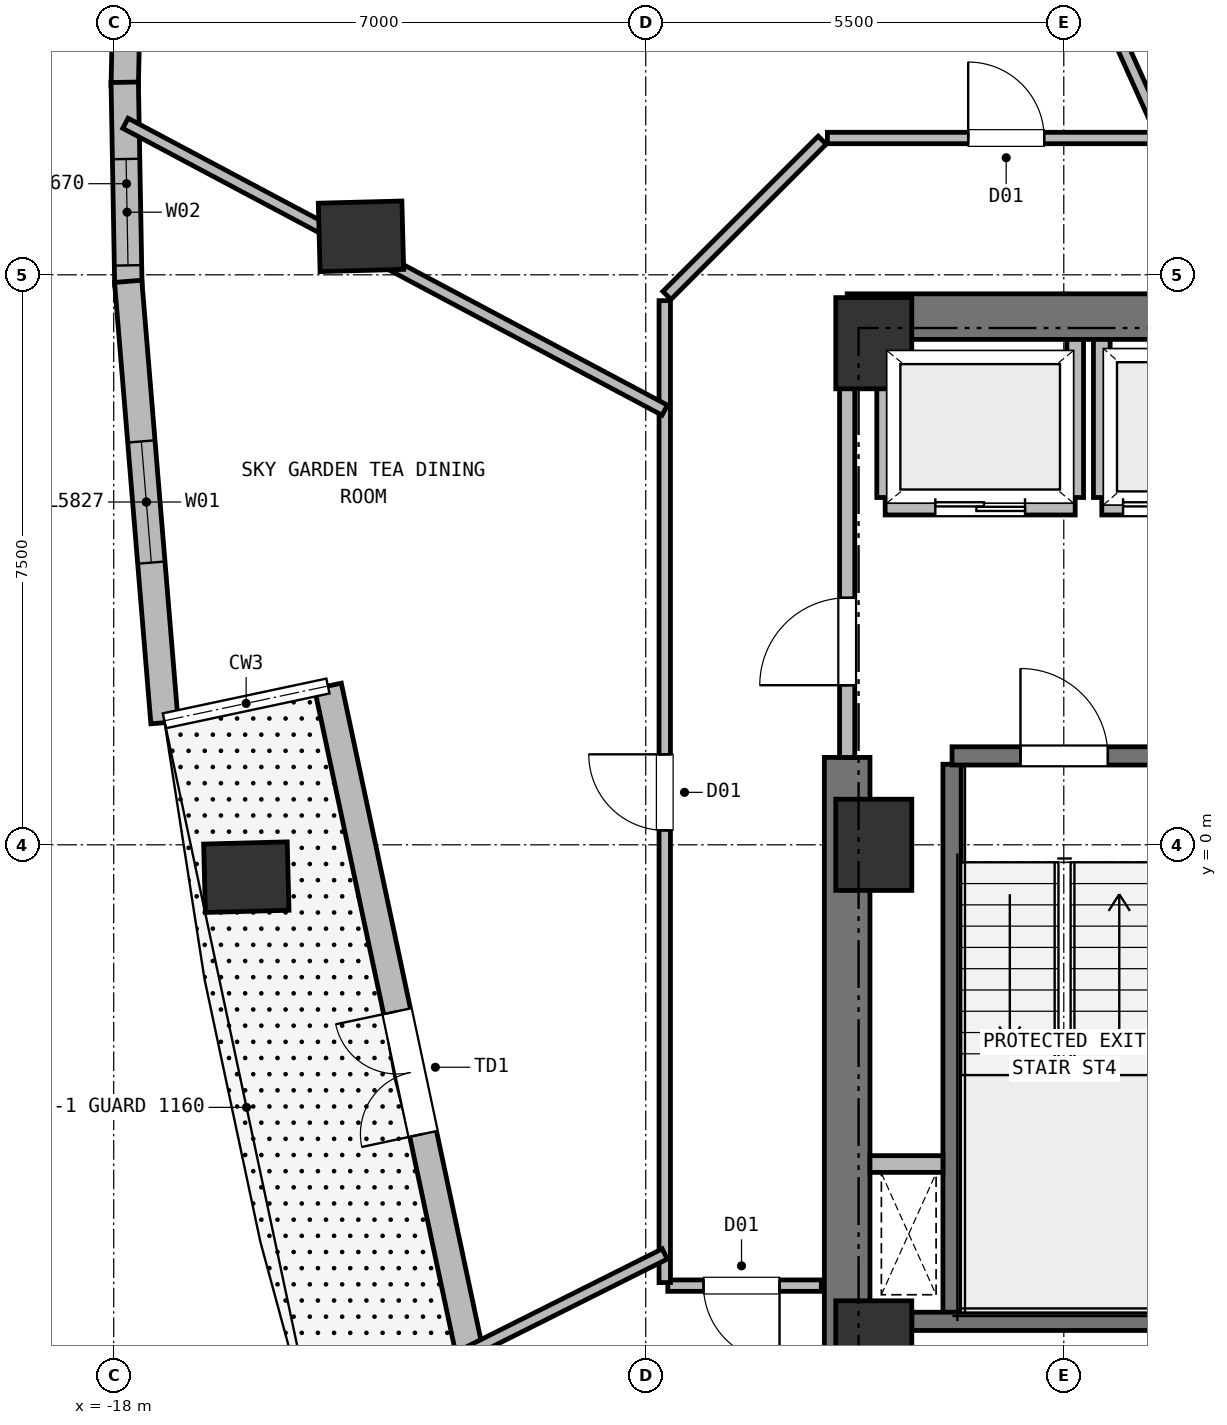
"""IFC4 building model, lengths in metres.
Left out: names, types, materials, properties, quantities, classifications, styles, units other than length and angle.
Written with IfcOpenShell. Run it as: python <this file> out.ifc"""

import sys

from ifc_helpers import new_model, si_unit, direction, frame, frame_2d, origin, origin_2d, place, context, subcontext, project, spatial, rectangle, extrude, element, fill, save


model = new_model("IFC4")
c1 = context("Model", 3, precision=1e-05, world=origin(), true_north=direction((0.0, 1.0)))
c2 = subcontext(c1, "Body", "Model", "MODEL_VIEW")
j1 = project(units=[si_unit("LENGTHUNIT", "METRE"), si_unit("PLANEANGLEUNIT", "RADIAN")], contexts=[c1])
p1 = place(None, origin())
s1 = spatial("IfcSite", under=j1, at=p1, CompositionType="ELEMENT")
p2 = place(p1, origin())
s2 = spatial("IfcBuilding", under=s1, at=p2, CompositionType="ELEMENT")
p3 = place(p2, frame((0.0, 0.0, 164.75)))
s3 = spatial("IfcBuildingStorey", under=s2, at=p3, CompositionType="ELEMENT", Elevation=164.75)
for number, where, z_axis, x_axis in (
    (1, (-8.0, -6.6, 0.0), (0.0, 0.0, 1.0), (1.0, 0.0, 0.0)),
    (2, (-8.0, 6.6, 0.0), (0.0, 0.0, 1.0), (1.0, 0.0, 0.0)),
    (3, (-8.0, 0.0, 0.0), (0.0, 0.0, 1.0), (1.0, 0.0, 0.0)),
):
    element("IfcColumn", number, at=place(p3, frame(where, z_axis=z_axis, x_axis=x_axis)), inside=s3, PredefinedType="COLUMN", context=c2, shape_type="SweptSolid", body=[
        extrude(rectangle(XDim=1.0, YDim=1.2, at=origin_2d()), origin(), (0.0, 0.0, 1.0), 3.75),
    ])
p4 = place(p3, frame((-8.35, 6.95, 0.0), z_axis=(0.0, 0.0, 1.0), x_axis=(1.0, 0.0, 0.0)))
e4 = element("IfcWall", 4, at=p4, inside=s3, PredefinedType="SHEAR", context=c2, shape_type="SweptSolid", body=[
    extrude(rectangle(XDim=16.7, YDim=0.6, at=frame_2d((8.35, 0.0))), origin(), (0.0, 0.0, 1.0), 3.44),
])
p5 = place(p3, frame((-8.35, -6.95, 0.0), z_axis=(0.0, 0.0, 1.0), x_axis=(0.0, 1.0, 0.0)))
e5 = element("IfcWall", 5, at=p5, inside=s3, PredefinedType="SHEAR", context=c2, shape_type="SweptSolid", body=[
    extrude(rectangle(XDim=8.1, YDim=0.6, at=frame_2d((4.05, 0.0))), origin(), (0.0, 0.0, 1.0), 3.44),
])
for number, where, z_axis, x_axis in (
    (6, (-14.747, 8.007, 0.0), (0.0, 0.0, 1.0), (-0.026, 1.0, 0.0)),
    (7, (-16.255, -0.426, 0.0), (0.0, 0.0, 1.0), (-0.026, 1.0, 0.0)),
):
    element("IfcColumn", number, at=place(p3, frame(where, z_axis=z_axis, x_axis=x_axis)), inside=s3, PredefinedType="COLUMN", context=c2, shape_type="SweptSolid", body=[
        extrude(rectangle(XDim=0.9, YDim=1.1, at=origin_2d()), origin(), (0.0, 0.0, 1.0), 3.75),
    ])
p6 = place(p3, frame((-13.02, -8.083, 0.0), z_axis=(0.0, 0.0, 1.0), x_axis=(-0.207898343446, 0.97815043771, 0.0)))
e8 = element("IfcWall", 8, at=p6, inside=s3, PredefinedType="SOLIDWALL", context=c2, shape_type="SweptSolid", body=[
    extrude(rectangle(XDim=10.4, YDim=0.36, at=frame_2d((5.2, 0.0))), origin(), (0.0, 0.0, 1.0), 3.44),
])
p7 = place(p6, frame((4.375, 0.0, 0.0)))
e9 = element("IfcOpeningElement", 9, at=p7, cuts=e8, PredefinedType="OPENING", context=c2, shape_type="SweptSolid", body=[
    extrude(rectangle(XDim=1.65, YDim=2.25, at=frame_2d((0.825, 1.125))), frame((0.0, 0.19, 0.0), z_axis=(0.0, -1.0, 0.0), x_axis=(1.0, 0.0, 0.0)), (0.0, 0.0, 1.0), 0.38),
])
p8 = place(p3, frame((-17.855, 9.983, 0.0), z_axis=(0.0, 0.0, 1.0), x_axis=(0.021042241885, 0.999778587516, 0.0)))
e10 = element("IfcWall", 10, at=p8, inside=s3, PredefinedType="SOLIDWALL", context=c2, shape_type="SweptSolid", body=[
    extrude(rectangle(XDim=2.692, YDim=0.36, at=frame_2d((1.346, 0.0))), origin(), (0.0, 0.0, 1.0), 3.44),
])
p9 = place(p8, frame((0.646, 0.0, 0.72)))
e11 = element("IfcOpeningElement", 11, at=p9, cuts=e10, PredefinedType="OPENING", context=c2, shape_type="SweptSolid", body=[
    extrude(rectangle(XDim=1.4, YDim=1.84, at=frame_2d((0.7, 0.92))), frame((0.0, 0.19, 0.0), z_axis=(0.0, -1.0, 0.0), x_axis=(1.0, 0.0, 0.0)), (0.0, 0.0, 1.0), 0.38),
])
p10 = place(p3, frame((-17.807, 7.364, 0.0), z_axis=(0.0, 0.0, 1.0), x_axis=(-0.017833073331, 0.999840978104, 0.0)))
e12 = element("IfcWall", 12, at=p10, inside=s3, PredefinedType="SOLIDWALL", context=c2, shape_type="SweptSolid", body=[
    extrude(rectangle(XDim=2.67, YDim=0.36, at=frame_2d((1.335, 0.0))), origin(), (0.0, 0.0, 1.0), 3.44),
])
p11 = place(p10, frame((0.26, 0.0, 0.72)))
e13 = element("IfcOpeningElement", 13, at=p11, cuts=e12, PredefinedType="OPENING", context=c2, shape_type="SweptSolid", body=[
    extrude(rectangle(XDim=1.4, YDim=1.84, at=frame_2d((0.7, 0.92))), frame((0.0, 0.19, 0.0), z_axis=(0.0, -1.0, 0.0), x_axis=(1.0, 0.0, 0.0)), (0.0, 0.0, 1.0), 0.38),
])
p12 = place(p3, frame((-17.332, 1.607, 0.0), z_axis=(0.0, 0.0, 1.0), x_axis=(-0.082081459556, 0.996625623791, 0.0)))
e14 = element("IfcWall", 14, at=p12, inside=s3, PredefinedType="SOLIDWALL", context=c2, shape_type="SweptSolid", body=[
    extrude(rectangle(XDim=5.827, YDim=0.36, at=frame_2d((2.914, 0.0))), origin(), (0.0, 0.0, 1.0), 3.44),
])
p13 = place(p12, frame((2.113, 0.0, 0.72)))
e15 = element("IfcOpeningElement", 15, at=p13, cuts=e14, PredefinedType="OPENING", context=c2, shape_type="SweptSolid", body=[
    extrude(rectangle(XDim=1.6, YDim=1.88, at=frame_2d((0.8, 0.94))), frame((0.0, 0.19, 0.0), z_axis=(0.0, -1.0, 0.0), x_axis=(1.0, 0.0, 0.0)), (0.0, 0.0, 1.0), 0.38),
])
p14 = place(p3, frame((-6.97, -6.16, 0.0), z_axis=(0.0, 0.0, 1.0), x_axis=(0.0, 1.0, 0.0)))
e16 = element("IfcWall", 16, at=p14, inside=s3, PredefinedType="SHEAR", context=c2, shape_type="SweptSolid", body=[
    extrude(rectangle(XDim=7.22, YDim=0.24, at=frame_2d((3.61, 0.0))), origin(), (0.0, 0.0, 1.0), 3.44),
])
p15 = place(p3, frame((-7.5, -6.27, 0.0), z_axis=(0.0, 0.0, 1.0), x_axis=(1.0, 0.0, 0.0)))
e17 = element("IfcWall", 17, at=p15, inside=s3, PredefinedType="SHEAR", context=c2, shape_type="SweptSolid", body=[
    extrude(rectangle(XDim=3.49, YDim=0.24, at=frame_2d((1.745, 0.0))), origin(), (0.0, 0.0, 1.0), 3.44),
])
p16 = place(p3, frame((-6.97, 1.17, 0.0), z_axis=(0.0, 0.0, 1.0), x_axis=(1.0, 0.0, 0.0)))
e18 = element("IfcWall", 18, at=p16, inside=s3, PredefinedType="SHEAR", context=c2, shape_type="SweptSolid", body=[
    extrude(rectangle(XDim=2.96, YDim=0.24, at=frame_2d((1.48, 0.0))), origin(), (0.0, 0.0, 1.0), 3.44),
])
p17 = place(p16, frame((0.9, 0.0, 0.0)))
e19 = element("IfcOpeningElement", 19, at=p17, cuts=e18, PredefinedType="OPENING", context=c2, shape_type="SweptSolid", body=[
    extrude(rectangle(XDim=1.15, YDim=2.15, at=frame_2d((0.575, 1.075))), frame((0.0, 0.13, 0.0), z_axis=(0.0, -1.0, 0.0), x_axis=(1.0, 0.0, 0.0)), (0.0, 0.0, 1.0), 0.26),
])
p18 = place(p3, frame((-8.05, -4.2, 0.0), z_axis=(0.0, 0.0, 1.0), x_axis=(1.0, 0.0, 0.0)))
e20 = element("IfcWall", 20, at=p18, inside=s3, PredefinedType="PARTITIONING", context=c2, shape_type="SweptSolid", body=[
    extrude(rectangle(XDim=0.96, YDim=0.22, at=frame_2d((0.48, 0.0))), origin(), (0.0, 0.0, 1.0), 3.44),
])
p19 = place(p3, frame((-7.85, 4.45, 0.0), z_axis=(0.0, 0.0, 1.0), x_axis=(1.0, 0.0, 0.0)))
e21 = element("IfcWall", 21, at=p19, inside=s3, PredefinedType="PARTITIONING", context=c2, shape_type="SweptSolid", body=[
    extrude(rectangle(XDim=2.5, YDim=0.22, at=frame_2d((1.25, 0.0))), origin(), (0.0, 0.0, 1.0), 3.44),
])
p20 = place(p19, frame((0.66, 0.0, 0.0)))
e22 = element("IfcOpeningElement", 22, at=p20, cuts=e21, PredefinedType="OPENING", context=c2, shape_type="SweptSolid", body=[
    extrude(rectangle(XDim=1.18, YDim=2.15, at=frame_2d((0.59, 1.075))), frame((0.0, 0.12, 0.0), z_axis=(0.0, -1.0, 0.0), x_axis=(1.0, 0.0, 0.0)), (0.0, 0.0, 1.0), 0.24),
])
p21 = place(p3, frame((-7.85, 4.57, 0.0), z_axis=(0.0, 0.0, 1.0), x_axis=(0.0, 1.0, 0.0)))
e23 = element("IfcWall", 23, at=p21, inside=s3, PredefinedType="PARTITIONING", context=c2, shape_type="SweptSolid", body=[
    extrude(rectangle(XDim=2.08, YDim=0.22, at=frame_2d((1.04, 0.0))), origin(), (0.0, 0.0, 1.0), 3.06),
])
p22 = place(p3, frame((-5.35, 4.57, 0.0), z_axis=(0.0, 0.0, 1.0), x_axis=(0.0, 1.0, 0.0)))
e24 = element("IfcWall", 24, at=p22, inside=s3, PredefinedType="PARTITIONING", context=c2, shape_type="SweptSolid", body=[
    extrude(rectangle(XDim=2.08, YDim=0.22, at=frame_2d((1.04, 0.0))), origin(), (0.0, 0.0, 1.0), 3.44),
])
p23 = place(p3, frame((-5.0, 4.45, 0.0), z_axis=(0.0, 0.0, 1.0), x_axis=(1.0, 0.0, 0.0)))
e25 = element("IfcWall", 25, at=p23, inside=s3, PredefinedType="PARTITIONING", context=c2, shape_type="SweptSolid", body=[
    extrude(rectangle(XDim=2.4, YDim=0.22, at=frame_2d((1.2, 0.0))), origin(), (0.0, 0.0, 1.0), 3.44),
])
p24 = place(p23, frame((0.28, 0.0, 0.0)))
e26 = element("IfcOpeningElement", 26, at=p24, cuts=e25, PredefinedType="OPENING", context=c2, shape_type="SweptSolid", body=[
    extrude(rectangle(XDim=1.22, YDim=2.15, at=frame_2d((0.61, 1.075))), frame((0.0, 0.12, 0.0), z_axis=(0.0, -1.0, 0.0), x_axis=(1.0, 0.0, 0.0)), (0.0, 0.0, 1.0), 0.24),
])
p25 = place(p3, frame((-5.0, 4.57, 0.0), z_axis=(0.0, 0.0, 1.0), x_axis=(0.0, 1.0, 0.0)))
e27 = element("IfcWall", 27, at=p25, inside=s3, PredefinedType="PARTITIONING", context=c2, shape_type="SweptSolid", body=[
    extrude(rectangle(XDim=2.08, YDim=0.22, at=frame_2d((1.04, 0.0))), origin(), (0.0, 0.0, 1.0), 3.44),
])
p26 = place(p3, frame((-8.35, 1.15, 0.0), z_axis=(0.0, 0.0, 1.0), x_axis=(0.0, 1.0, 0.0)))
e28 = element("IfcWall", 28, at=p26, inside=s3, PredefinedType="PARTITIONING", context=c2, shape_type="SweptSolid", body=[
    extrude(rectangle(XDim=5.4, YDim=0.2, at=frame_2d((2.7, 0.0))), origin(), (0.0, 0.0, 1.0), 3.44),
])
p27 = place(p26, frame((0.95, 0.0, 0.0)))
e29 = element("IfcOpeningElement", 29, at=p27, cuts=e28, PredefinedType="OPENING", context=c2, shape_type="SweptSolid", body=[
    extrude(rectangle(XDim=1.15, YDim=2.15, at=frame_2d((0.575, 1.075))), frame((0.0, 0.11, 0.0), z_axis=(0.0, -1.0, 0.0), x_axis=(1.0, 0.0, 0.0)), (0.0, 0.0, 1.0), 0.22),
])
p28 = place(p3, frame((-8.69, -5.8, 0.0), z_axis=(0.0, 0.0, 1.0), x_axis=(-1.0, 0.0, 0.0)))
e30 = element("IfcWall", 30, at=p28, inside=s3, PredefinedType="PARTITIONING", context=c2, shape_type="SweptSolid", body=[
    extrude(rectangle(XDim=2.02, YDim=0.15, at=frame_2d((1.01, 0.0))), origin(), (0.0, 0.0, 1.0), 3.44),
])
p29 = place(p28, frame((0.55, 0.0, 0.0)))
e31 = element("IfcOpeningElement", 31, at=p29, cuts=e30, PredefinedType="OPENING", context=c2, shape_type="SweptSolid", body=[
    extrude(rectangle(XDim=1.0, YDim=2.15, at=frame_2d((0.5, 1.075))), frame((0.0, 0.085, 0.0), z_axis=(0.0, -1.0, 0.0), x_axis=(1.0, 0.0, 0.0)), (0.0, 0.0, 1.0), 0.17),
])
p30 = place(p3, frame((-8.61, 9.3, 0.0), z_axis=(0.0, 0.0, 1.0), x_axis=(1.0, 0.0, 0.0)))
e32 = element("IfcWall", 32, at=p30, inside=s3, PredefinedType="PARTITIONING", context=c2, shape_type="SweptSolid", body=[
    extrude(rectangle(XDim=17.22, YDim=0.15, at=frame_2d((8.61, 0.0))), origin(), (0.0, 0.0, 1.0), 3.44),
])
p31 = place(p30, frame((5.472, 0.0, 0.0)))
e33 = element("IfcOpeningElement", 33, at=p31, cuts=e32, PredefinedType="OPENING", context=c2, shape_type="SweptSolid", body=[
    extrude(rectangle(XDim=1.06, YDim=2.15, at=frame_2d((0.53, 1.075))), frame((0.0, 0.085, 0.0), z_axis=(0.0, -1.0, 0.0), x_axis=(1.0, 0.0, 0.0)), (0.0, 0.0, 1.0), 0.17),
])
p32 = place(p30, frame((13.018, 0.0, 0.0)))
e34 = element("IfcOpeningElement", 34, at=p32, cuts=e32, PredefinedType="OPENING", context=c2, shape_type="SweptSolid", body=[
    extrude(rectangle(XDim=1.0, YDim=2.15, at=frame_2d((0.5, 1.075))), frame((0.0, 0.085, 0.0), z_axis=(0.0, -1.0, 0.0), x_axis=(1.0, 0.0, 0.0)), (0.0, 0.0, 1.0), 0.17),
])
p33 = place(p30, frame((1.852, 0.0, 0.0)))
e35 = element("IfcOpeningElement", 35, at=p33, cuts=e32, PredefinedType="OPENING", context=c2, shape_type="SweptSolid", body=[
    extrude(rectangle(XDim=1.0, YDim=2.15, at=frame_2d((0.5, 1.075))), frame((0.0, 0.085, 0.0), z_axis=(0.0, -1.0, 0.0), x_axis=(1.0, 0.0, 0.0)), (0.0, 0.0, 1.0), 0.17),
])
p34 = place(p3, frame((-10.722, 7.228, 0.0), z_axis=(0.0, 0.0, 1.0), x_axis=(0.707106781187, 0.707106781187, 0.0)))
e36 = element("IfcWall", 36, at=p34, inside=s3, PredefinedType="PARTITIONING", context=c2, shape_type="SweptSolid", body=[
    extrude(rectangle(XDim=2.89, YDim=0.15, at=frame_2d((1.445, 0.0))), origin(), (0.0, 0.0, 1.0), 3.44),
])
p35 = place(p3, frame((-10.75, -5.76, 0.0), z_axis=(0.0, 0.0, 1.0), x_axis=(0.0, 1.0, 0.0)))
e37 = element("IfcWall", 37, at=p35, inside=s3, PredefinedType="PARTITIONING", context=c2, shape_type="SweptSolid", body=[
    extrude(rectangle(XDim=12.92, YDim=0.15, at=frame_2d((6.46, 0.0))), origin(), (0.0, 0.0, 1.0), 3.44),
])
p36 = place(p35, frame((5.95, 0.0, 0.0)))
e38 = element("IfcOpeningElement", 38, at=p36, cuts=e37, PredefinedType="OPENING", context=c2, shape_type="SweptSolid", body=[
    extrude(rectangle(XDim=1.0, YDim=2.15, at=frame_2d((0.5, 1.075))), frame((0.0, 0.085, 0.0), z_axis=(0.0, -1.0, 0.0), x_axis=(1.0, 0.0, 0.0)), (0.0, 0.0, 1.0), 0.17),
])
p37 = place(p3, frame((-10.75, -5.383, 0.0), z_axis=(0.0, 0.0, 1.0), x_axis=(-0.894160863769, -0.447745853922, 0.0)))
e39 = element("IfcWall", 39, at=p37, inside=s3, PredefinedType="PARTITIONING", context=c2, shape_type="SweptSolid", body=[
    extrude(rectangle(XDim=2.935, YDim=0.15, at=frame_2d((1.468, 0.0))), origin(), (0.0, 0.0, 1.0), 3.44),
])
p38 = place(p3, frame((-4.185, 9.3, 0.0), z_axis=(0.0, 0.0, 1.0), x_axis=(-0.41041322582, 0.9118996568, 0.0)))
e40 = element("IfcWall", 40, at=p38, inside=s3, PredefinedType="PARTITIONING", context=c2, shape_type="SweptSolid", body=[
    extrude(rectangle(XDim=10.455, YDim=0.15, at=frame_2d((5.228, 0.0))), origin(), (0.0, 0.0, 1.0), 3.44),
])
p39 = place(p3, frame((-10.75, 5.719, 0.0), z_axis=(0.0, 0.0, 1.0), x_axis=(-0.882835139179, 0.469682996318, 0.0)))
e41 = element("IfcWall", 41, at=p39, inside=s3, PredefinedType="PARTITIONING", context=c2, shape_type="SweptSolid", body=[
    extrude(rectangle(XDim=8.037, YDim=0.15, at=frame_2d((4.019, 0.0))), origin(), (0.0, 0.0, 1.0), 3.44),
])
p40 = place(p7, origin())
e42 = element("IfcDoor", 42, at=p40, inside=s3, OperationType="DOUBLE_DOOR_SINGLE_SWING", PredefinedType="DOOR", context=c2, shape_type="SweptSolid", body=[
    extrude(rectangle(XDim=1.65, YDim=2.25, at=frame_2d((0.825, 1.125))), frame((0.0, 0.025, 0.0), z_axis=(0.0, -1.0, 0.0), x_axis=(1.0, 0.0, 0.0)), (0.0, 0.0, 1.0), 0.05),
])
fill(e9, e42)
p41 = place(p11, origin())
e43 = element("IfcWindow", 43, at=p41, inside=s3, PartitioningType="SINGLE_PANEL", PredefinedType="WINDOW", context=c2, shape_type="SweptSolid", body=[
    extrude(rectangle(XDim=1.4, YDim=1.84, at=frame_2d((0.7, 0.92))), frame((0.0, 0.03, 0.0), z_axis=(0.0, -1.0, 0.0), x_axis=(1.0, 0.0, 0.0)), (0.0, 0.0, 1.0), 0.06),
])
fill(e13, e43)
p42 = place(p13, origin())
e44 = element("IfcWindow", 44, at=p42, inside=s3, PartitioningType="SINGLE_PANEL", PredefinedType="WINDOW", context=c2, shape_type="SweptSolid", body=[
    extrude(rectangle(XDim=1.6, YDim=1.88, at=frame_2d((0.8, 0.94))), frame((0.0, 0.03, 0.0), z_axis=(0.0, -1.0, 0.0), x_axis=(1.0, 0.0, 0.0)), (0.0, 0.0, 1.0), 0.06),
])
fill(e15, e44)
p43 = place(p17, origin())
e45 = element("IfcDoor", 45, at=p43, inside=s3, OperationType="SINGLE_SWING_LEFT", PredefinedType="DOOR", context=c2, shape_type="SweptSolid", body=[
    extrude(rectangle(XDim=1.15, YDim=2.15, at=frame_2d((0.575, 1.075))), frame((0.0, 0.025, 0.0), z_axis=(0.0, -1.0, 0.0), x_axis=(1.0, 0.0, 0.0)), (0.0, 0.0, 1.0), 0.05),
])
fill(e19, e45)
p44 = place(p20, origin())
e46 = element("IfcDoor", 46, at=p44, inside=s3, OperationType="DOUBLE_DOOR_SLIDING", PredefinedType="DOOR", context=c2, shape_type="SweptSolid", body=[
    extrude(rectangle(XDim=1.18, YDim=2.15, at=frame_2d((0.59, 1.075))), frame((0.0, 0.025, 0.0), z_axis=(0.0, -1.0, 0.0), x_axis=(1.0, 0.0, 0.0)), (0.0, 0.0, 1.0), 0.05),
])
fill(e22, e46)
p45 = place(p24, origin())
e47 = element("IfcDoor", 47, at=p45, inside=s3, OperationType="DOUBLE_DOOR_SLIDING", PredefinedType="DOOR", context=c2, shape_type="SweptSolid", body=[
    extrude(rectangle(XDim=1.22, YDim=2.15, at=frame_2d((0.61, 1.075))), frame((0.0, 0.025, 0.0), z_axis=(0.0, -1.0, 0.0), x_axis=(1.0, 0.0, 0.0)), (0.0, 0.0, 1.0), 0.05),
])
fill(e26, e47)
p46 = place(p27, origin())
e48 = element("IfcDoor", 48, at=p46, inside=s3, OperationType="SINGLE_SWING_LEFT", PredefinedType="DOOR", context=c2, shape_type="SweptSolid", body=[
    extrude(rectangle(XDim=1.15, YDim=2.15, at=frame_2d((0.575, 1.075))), frame((0.0, 0.025, 0.0), z_axis=(0.0, -1.0, 0.0), x_axis=(1.0, 0.0, 0.0)), (0.0, 0.0, 1.0), 0.05),
])
fill(e29, e48)
p47 = place(p36, origin())
e49 = element("IfcDoor", 49, at=p47, inside=s3, OperationType="SINGLE_SWING_RIGHT", PredefinedType="DOOR", context=c2, shape_type="SweptSolid", body=[
    extrude(rectangle(XDim=1.0, YDim=2.15, at=frame_2d((0.5, 1.075))), frame((0.0, 0.025, 0.0), z_axis=(0.0, -1.0, 0.0), x_axis=(1.0, 0.0, 0.0)), (0.0, 0.0, 1.0), 0.05),
])
fill(e38, e49)
p48 = place(p33, origin())
e50 = element("IfcDoor", 50, at=p48, inside=s3, OperationType="SINGLE_SWING_LEFT", PredefinedType="DOOR", context=c2, shape_type="SweptSolid", body=[
    extrude(rectangle(XDim=1.0, YDim=2.15, at=frame_2d((0.5, 1.075))), frame((0.0, 0.025, 0.0), z_axis=(0.0, -1.0, 0.0), x_axis=(1.0, 0.0, 0.0)), (0.0, 0.0, 1.0), 0.05),
])
fill(e35, e50)
p49 = place(p29, origin())
e51 = element("IfcDoor", 51, at=p49, inside=s3, OperationType="SINGLE_SWING_LEFT", PredefinedType="DOOR", context=c2, shape_type="SweptSolid", body=[
    extrude(rectangle(XDim=1.0, YDim=2.15, at=frame_2d((0.5, 1.075))), frame((0.0, 0.025, 0.0), z_axis=(0.0, -1.0, 0.0), x_axis=(1.0, 0.0, 0.0)), (0.0, 0.0, 1.0), 0.05),
])
fill(e31, e51)
save(model, sys.argv[1])
